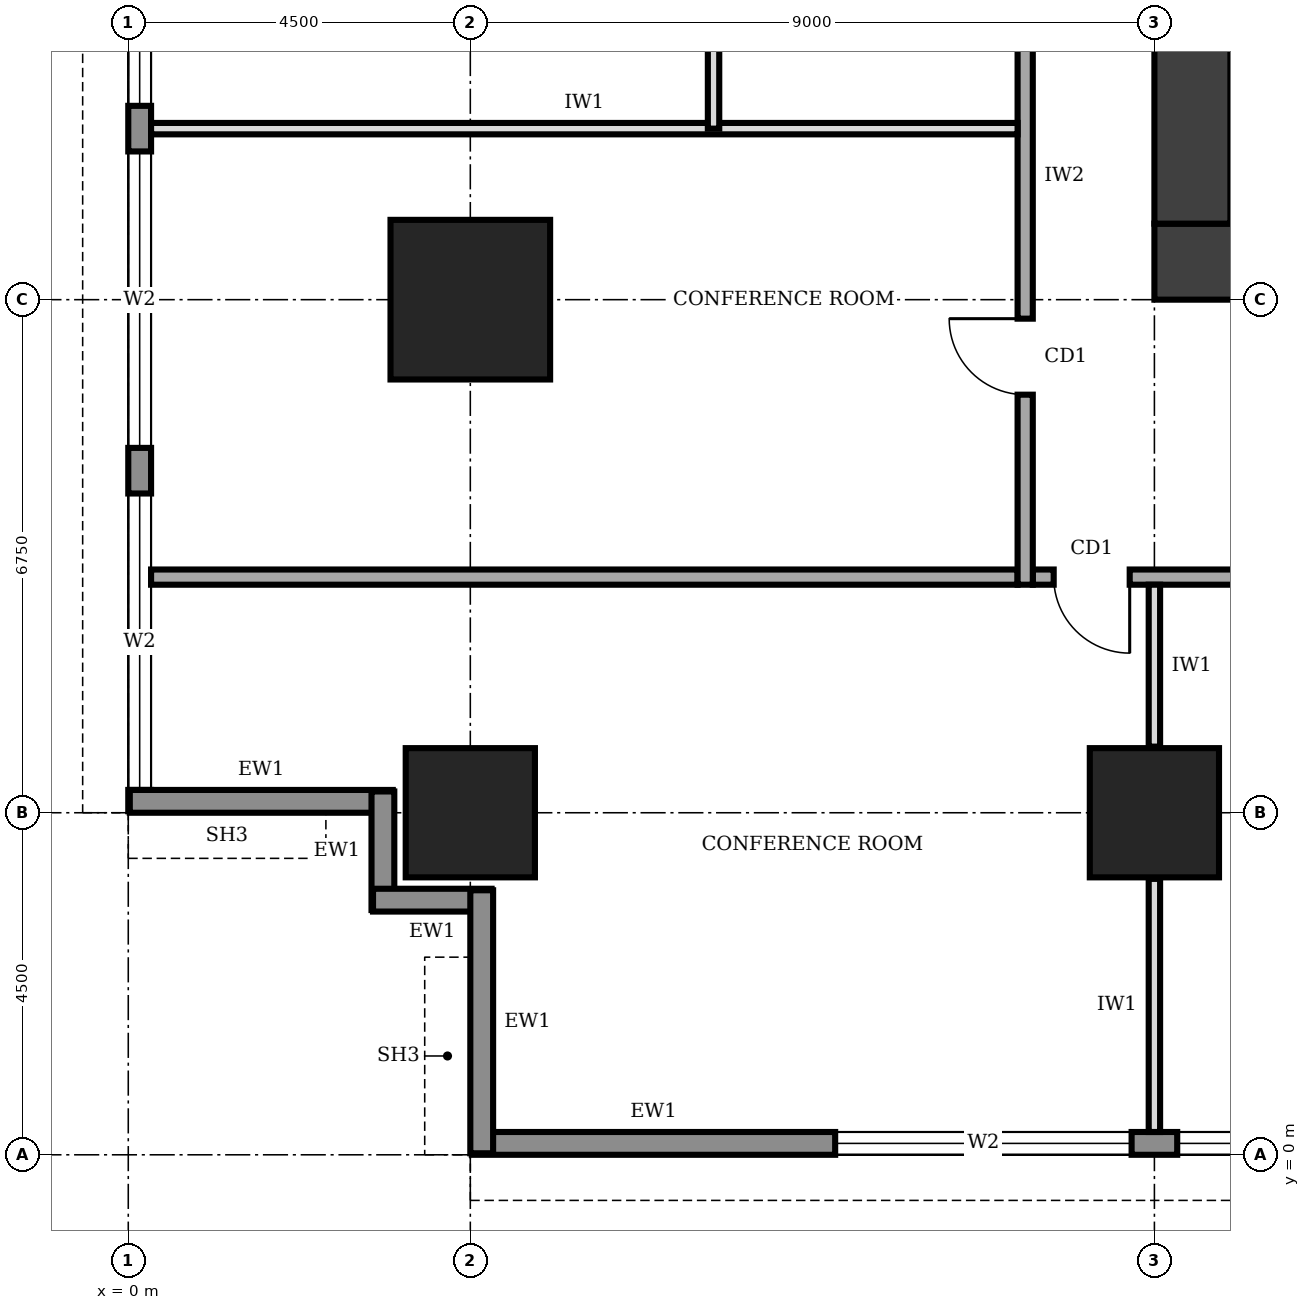
"""IFC4 building model, lengths in metres.
Left out: names, types, materials, properties, quantities, classifications, styles, units other than length and angle.
Written with IfcOpenShell. Run it as: python <this file> out.ifc"""

import sys

from ifc_helpers import new_model, si_unit, direction, frame, frame_2d, origin, origin_2d, place, context, subcontext, project, spatial, rectangle, extrude, element, fill, save


model = new_model("IFC4")
c1 = context("Model", 3, precision=1e-05, world=origin(), true_north=direction((0.0, 1.0)))
c2 = subcontext(c1, "Body", "Model", "MODEL_VIEW")
j1 = project(units=[si_unit("LENGTHUNIT", "METRE"), si_unit("PLANEANGLEUNIT", "RADIAN")], contexts=[c1])
p1 = place(None, origin())
s1 = spatial("IfcSite", under=j1, at=p1, CompositionType="ELEMENT")
p2 = place(p1, origin())
s2 = spatial("IfcBuilding", under=s1, at=p2, CompositionType="ELEMENT")
p3 = place(p2, frame((0.0, 0.0, 149.0)))
s3 = spatial("IfcBuildingStorey", under=s2, at=p3, CompositionType="ELEMENT", Elevation=149.0)
p4 = place(p3, frame((13.5, 11.75, 0.0), z_axis=(0.0, 0.0, 1.0), x_axis=(1.0, 0.0, 0.0)))
e1 = element("IfcWall", 1, at=p4, inside=s3, PredefinedType="SHEAR", context=c2, shape_type="SweptSolid", body=[
    extrude(rectangle(XDim=13.5, YDim=1.0, at=frame_2d((6.75, 0.0))), origin(), (0.0, 0.0, 1.0), 4.0),
])
p5 = place(p4, frame((4.75, 0.0, 0.0)))
e2 = element("IfcOpeningElement", 2, at=p5, cuts=e1, PredefinedType="OPENING", context=c2, shape_type="SweptSolid", body=[
    extrude(rectangle(XDim=1.0, YDim=2.1, at=frame_2d((0.5, 1.05))), frame((0.0, 0.51, 0.0), z_axis=(0.0, -1.0, 0.0), x_axis=(1.0, 0.0, 0.0)), (0.0, 0.0, 1.0), 1.02),
])
p6 = place(p3, frame((14.0, 28.25, 0.0), z_axis=(0.0, 0.0, 1.0), x_axis=(0.0, -1.0, 0.0)))
e3 = element("IfcWall", 3, at=p6, inside=s3, PredefinedType="SHEAR", context=c2, shape_type="SweptSolid", body=[
    extrude(rectangle(XDim=16.0, YDim=1.0, at=frame_2d((8.0, 0.0))), origin(), (0.0, 0.0, 1.0), 4.0),
])
for number, where, z_axis, x_axis in (
    (4, (4.5, 4.5, 0.0), (0.0, 0.0, 1.0), (1.0, 0.0, 0.0)),
    (5, (13.5, 4.5, 0.0), (0.0, 0.0, 1.0), (1.0, 0.0, 0.0)),
):
    element("IfcColumn", number, at=place(p3, frame(where, z_axis=z_axis, x_axis=x_axis)), inside=s3, PredefinedType="COLUMN", context=c2, shape_type="SweptSolid", body=[
        extrude(rectangle(XDim=1.7, YDim=1.7, at=origin_2d()), origin(), (0.0, 0.0, 1.0), 4.0),
    ])
p7 = place(p3, frame((4.5, 11.25, 0.0), z_axis=(0.0, 0.0, 1.0), x_axis=(1.0, 0.0, 0.0)))
e6 = element("IfcColumn", 6, at=p7, inside=s3, PredefinedType="COLUMN", context=c2, shape_type="SweptSolid", body=[
    extrude(rectangle(XDim=2.1, YDim=2.1, at=origin_2d()), origin(), (0.0, 0.0, 1.0), 4.0),
])
p8 = place(p3, frame((4.52, 0.15, 0.0), z_axis=(0.0, 0.0, 1.0), x_axis=(1.0, 0.0, 0.0)))
e7 = element("IfcWall", 7, at=p8, inside=s3, PredefinedType="STANDARD", context=c2, shape_type="SweptSolid", body=[
    extrude(rectangle(XDim=31.46, YDim=0.3, at=frame_2d((15.73, 0.0))), origin(), (0.0, 0.0, 1.0), 3.75),
])
p9 = place(p8, frame((4.78, 0.0, 0.6)))
e8 = element("IfcOpeningElement", 8, at=p9, cuts=e7, PredefinedType="OPENING", context=c2, shape_type="SweptSolid", body=[
    extrude(rectangle(XDim=3.9, YDim=2.6, at=frame_2d((1.95, 1.3))), frame((0.0, 0.16, 0.0), z_axis=(0.0, -1.0, 0.0), x_axis=(1.0, 0.0, 0.0)), (0.0, 0.0, 1.0), 0.32),
])
p10 = place(p8, frame((9.28, 0.0, 0.6)))
e9 = element("IfcOpeningElement", 9, at=p10, cuts=e7, PredefinedType="OPENING", context=c2, shape_type="SweptSolid", body=[
    extrude(rectangle(XDim=3.9, YDim=2.6, at=frame_2d((1.95, 1.3))), frame((0.0, 0.16, 0.0), z_axis=(0.0, -1.0, 0.0), x_axis=(1.0, 0.0, 0.0)), (0.0, 0.0, 1.0), 0.32),
])
p11 = place(p8, frame((13.78, 0.0, 0.6)))
e10 = element("IfcOpeningElement", 10, at=p11, cuts=e7, PredefinedType="OPENING", context=c2, shape_type="SweptSolid", body=[
    extrude(rectangle(XDim=3.9, YDim=2.6, at=frame_2d((1.95, 1.3))), frame((0.0, 0.16, 0.0), z_axis=(0.0, -1.0, 0.0), x_axis=(1.0, 0.0, 0.0)), (0.0, 0.0, 1.0), 0.32),
])
p12 = place(p8, frame((18.28, 0.0, 0.6)))
e11 = element("IfcOpeningElement", 11, at=p12, cuts=e7, PredefinedType="OPENING", context=c2, shape_type="SweptSolid", body=[
    extrude(rectangle(XDim=3.9, YDim=2.6, at=frame_2d((1.95, 1.3))), frame((0.0, 0.16, 0.0), z_axis=(0.0, -1.0, 0.0), x_axis=(1.0, 0.0, 0.0)), (0.0, 0.0, 1.0), 0.32),
])
p13 = place(p8, frame((22.78, 0.0, 0.6)))
e12 = element("IfcOpeningElement", 12, at=p13, cuts=e7, PredefinedType="OPENING", context=c2, shape_type="SweptSolid", body=[
    extrude(rectangle(XDim=3.9, YDim=2.6, at=frame_2d((1.95, 1.3))), frame((0.0, 0.16, 0.0), z_axis=(0.0, -1.0, 0.0), x_axis=(1.0, 0.0, 0.0)), (0.0, 0.0, 1.0), 0.32),
])
p14 = place(p8, frame((27.28, 0.0, 0.6)))
e13 = element("IfcOpeningElement", 13, at=p14, cuts=e7, PredefinedType="OPENING", context=c2, shape_type="SweptSolid", body=[
    extrude(rectangle(XDim=3.9, YDim=2.6, at=frame_2d((1.95, 1.3))), frame((0.0, 0.16, 0.0), z_axis=(0.0, -1.0, 0.0), x_axis=(1.0, 0.0, 0.0)), (0.0, 0.0, 1.0), 0.32),
])
p15 = place(p3, frame((0.15, 35.98, 0.0), z_axis=(0.0, 0.0, 1.0), x_axis=(0.0, -1.0, 0.0)))
e14 = element("IfcWall", 14, at=p15, inside=s3, PredefinedType="STANDARD", context=c2, shape_type="SweptSolid", body=[
    extrude(rectangle(XDim=31.46, YDim=0.3, at=frame_2d((15.73, 0.0))), origin(), (0.0, 0.0, 1.0), 3.75),
])
p16 = place(p15, frame((27.28, 0.0, 0.6)))
e15 = element("IfcOpeningElement", 15, at=p16, cuts=e14, PredefinedType="OPENING", context=c2, shape_type="SweptSolid", body=[
    extrude(rectangle(XDim=3.9, YDim=2.6, at=frame_2d((1.95, 1.3))), frame((0.0, 0.16, 0.0), z_axis=(0.0, -1.0, 0.0), x_axis=(1.0, 0.0, 0.0)), (0.0, 0.0, 1.0), 0.32),
])
p17 = place(p15, frame((22.78, 0.0, 0.6)))
e16 = element("IfcOpeningElement", 16, at=p17, cuts=e14, PredefinedType="OPENING", context=c2, shape_type="SweptSolid", body=[
    extrude(rectangle(XDim=3.9, YDim=2.6, at=frame_2d((1.95, 1.3))), frame((0.0, 0.16, 0.0), z_axis=(0.0, -1.0, 0.0), x_axis=(1.0, 0.0, 0.0)), (0.0, 0.0, 1.0), 0.32),
])
p18 = place(p15, frame((18.28, 0.0, 0.6)))
e17 = element("IfcOpeningElement", 17, at=p18, cuts=e14, PredefinedType="OPENING", context=c2, shape_type="SweptSolid", body=[
    extrude(rectangle(XDim=3.9, YDim=2.6, at=frame_2d((1.95, 1.3))), frame((0.0, 0.16, 0.0), z_axis=(0.0, -1.0, 0.0), x_axis=(1.0, 0.0, 0.0)), (0.0, 0.0, 1.0), 0.32),
])
p19 = place(p15, frame((13.78, 0.0, 0.6)))
e18 = element("IfcOpeningElement", 18, at=p19, cuts=e14, PredefinedType="OPENING", context=c2, shape_type="SweptSolid", body=[
    extrude(rectangle(XDim=3.9, YDim=2.6, at=frame_2d((1.95, 1.3))), frame((0.0, 0.16, 0.0), z_axis=(0.0, -1.0, 0.0), x_axis=(1.0, 0.0, 0.0)), (0.0, 0.0, 1.0), 0.32),
])
p20 = place(p15, frame((9.28, 0.0, 0.6)))
e19 = element("IfcOpeningElement", 19, at=p20, cuts=e14, PredefinedType="OPENING", context=c2, shape_type="SweptSolid", body=[
    extrude(rectangle(XDim=3.9, YDim=2.6, at=frame_2d((1.95, 1.3))), frame((0.0, 0.16, 0.0), z_axis=(0.0, -1.0, 0.0), x_axis=(1.0, 0.0, 0.0)), (0.0, 0.0, 1.0), 0.32),
])
p21 = place(p15, frame((4.78, 0.0, 0.6)))
e20 = element("IfcOpeningElement", 20, at=p21, cuts=e14, PredefinedType="OPENING", context=c2, shape_type="SweptSolid", body=[
    extrude(rectangle(XDim=3.9, YDim=2.6, at=frame_2d((1.95, 1.3))), frame((0.0, 0.16, 0.0), z_axis=(0.0, -1.0, 0.0), x_axis=(1.0, 0.0, 0.0)), (0.0, 0.0, 1.0), 0.32),
])
p22 = place(p3, frame((0.02, 4.65, 0.0), z_axis=(0.0, 0.0, 1.0), x_axis=(1.0, 0.0, 0.0)))
e21 = element("IfcWall", 21, at=p22, inside=s3, PredefinedType="STANDARD", context=c2, shape_type="SweptSolid", body=[
    extrude(rectangle(XDim=3.46, YDim=0.3, at=frame_2d((1.73, 0.0))), origin(), (0.0, 0.0, 1.0), 2.85),
])
for number, where, z_axis, x_axis in (
    (22, (3.35, 4.78, 0.0), (0.0, 0.0, 1.0), (0.0, -1.0, 0.0)),
    (23, (3.22, 3.35, 0.0), (0.0, 0.0, 1.0), (1.0, 0.0, 0.0)),
):
    element("IfcWall", number, at=place(p3, frame(where, z_axis=z_axis, x_axis=x_axis)), inside=s3, PredefinedType="STANDARD", context=c2, shape_type="SweptSolid", body=[
        extrude(rectangle(XDim=1.56, YDim=0.3, at=frame_2d((0.78, 0.0))), origin(), (0.0, 0.0, 1.0), 3.75),
    ])
p23 = place(p3, frame((4.65, 3.48, 0.0), z_axis=(0.0, 0.0, 1.0), x_axis=(0.0, -1.0, 0.0)))
e24 = element("IfcWall", 24, at=p23, inside=s3, PredefinedType="STANDARD", context=c2, shape_type="SweptSolid", body=[
    extrude(rectangle(XDim=3.46, YDim=0.3, at=frame_2d((1.73, 0.0))), origin(), (0.0, 0.0, 1.0), 2.85),
])
p24 = place(p3, frame((11.9, 7.6, 0.0), z_axis=(0.0, 0.0, 1.0), x_axis=(1.0, 0.0, 0.0)))
e25 = element("IfcWall", 25, at=p24, inside=s3, PredefinedType="SOLIDWALL", context=c2, shape_type="SweptSolid", body=[
    extrude(rectangle(XDim=28.3, YDim=0.2, at=frame_2d((14.15, 0.0))), origin(), (0.0, 0.0, 1.0), 3.75),
])
p25 = place(p24, frame((0.275, 0.0, 0.0)))
e26 = element("IfcOpeningElement", 26, at=p25, cuts=e25, PredefinedType="OPENING", context=c2, shape_type="SweptSolid", body=[
    extrude(rectangle(XDim=1.0, YDim=2.1, at=frame_2d((0.5, 1.05))), frame((0.0, 0.11, 0.0), z_axis=(0.0, -1.0, 0.0), x_axis=(1.0, 0.0, 0.0)), (0.0, 0.0, 1.0), 0.22),
])
p26 = place(p24, frame((14.35, 0.0, 0.0)))
e27 = element("IfcOpeningElement", 27, at=p26, cuts=e25, PredefinedType="OPENING", context=c2, shape_type="SweptSolid", body=[
    extrude(rectangle(XDim=1.4, YDim=2.1, at=frame_2d((0.7, 1.05))), frame((0.0, 0.11, 0.0), z_axis=(0.0, -1.0, 0.0), x_axis=(1.0, 0.0, 0.0)), (0.0, 0.0, 1.0), 0.22),
])
p27 = place(p3, frame((11.8, 32.8, 0.0), z_axis=(0.0, 0.0, 1.0), x_axis=(0.0, -1.0, 0.0)))
e28 = element("IfcWall", 28, at=p27, inside=s3, PredefinedType="SOLIDWALL", context=c2, shape_type="SweptSolid", body=[
    extrude(rectangle(XDim=25.3, YDim=0.2, at=frame_2d((12.65, 0.0))), origin(), (0.0, 0.0, 1.0), 3.75),
])
p28 = place(p27, frame((21.8, 0.0, 0.0)))
e29 = element("IfcOpeningElement", 29, at=p28, cuts=e28, PredefinedType="OPENING", context=c2, shape_type="SweptSolid", body=[
    extrude(rectangle(XDim=1.0, YDim=2.1, at=frame_2d((0.5, 1.05))), frame((0.0, 0.11, 0.0), z_axis=(0.0, -1.0, 0.0), x_axis=(1.0, 0.0, 0.0)), (0.0, 0.0, 1.0), 0.22),
])
p29 = place(p27, frame((17.15, 0.0, 0.0)))
e30 = element("IfcOpeningElement", 30, at=p29, cuts=e28, PredefinedType="OPENING", context=c2, shape_type="SweptSolid", body=[
    extrude(rectangle(XDim=0.9, YDim=2.1, at=frame_2d((0.45, 1.05))), frame((0.0, 0.11, 0.0), z_axis=(0.0, -1.0, 0.0), x_axis=(1.0, 0.0, 0.0)), (0.0, 0.0, 1.0), 0.22),
])
p30 = place(p27, frame((12.35, 0.0, 0.0)))
e31 = element("IfcOpeningElement", 31, at=p30, cuts=e28, PredefinedType="OPENING", context=c2, shape_type="SweptSolid", body=[
    extrude(rectangle(XDim=0.9, YDim=2.1, at=frame_2d((0.45, 1.05))), frame((0.0, 0.11, 0.0), z_axis=(0.0, -1.0, 0.0), x_axis=(1.0, 0.0, 0.0)), (0.0, 0.0, 1.0), 0.22),
])
p31 = place(p27, frame((9.3, 0.0, 0.0)))
e32 = element("IfcOpeningElement", 32, at=p31, cuts=e28, PredefinedType="OPENING", context=c2, shape_type="SweptSolid", body=[
    extrude(rectangle(XDim=0.9, YDim=2.1, at=frame_2d((0.45, 1.05))), frame((0.0, 0.11, 0.0), z_axis=(0.0, -1.0, 0.0), x_axis=(1.0, 0.0, 0.0)), (0.0, 0.0, 1.0), 0.22),
])
p32 = place(p27, frame((6.3, 0.0, 0.0)))
e33 = element("IfcOpeningElement", 33, at=p32, cuts=e28, PredefinedType="OPENING", context=c2, shape_type="SweptSolid", body=[
    extrude(rectangle(XDim=1.0, YDim=2.1, at=frame_2d((0.5, 1.05))), frame((0.0, 0.11, 0.0), z_axis=(0.0, -1.0, 0.0), x_axis=(1.0, 0.0, 0.0)), (0.0, 0.0, 1.0), 0.22),
])
p33 = place(p27, frame((14.4, 0.0, 0.0)))
e34 = element("IfcOpeningElement", 34, at=p33, cuts=e28, PredefinedType="OPENING", context=c2, shape_type="SweptSolid", body=[
    extrude(rectangle(XDim=1.0, YDim=2.1, at=frame_2d((0.5, 1.05))), frame((0.0, 0.11, 0.0), z_axis=(0.0, -1.0, 0.0), x_axis=(1.0, 0.0, 0.0)), (0.0, 0.0, 1.0), 0.22),
])
p34 = place(p27, frame((2.3, 0.0, 0.0)))
e35 = element("IfcOpeningElement", 35, at=p34, cuts=e28, PredefinedType="OPENING", context=c2, shape_type="SweptSolid", body=[
    extrude(rectangle(XDim=1.0, YDim=2.1, at=frame_2d((0.5, 1.05))), frame((0.0, 0.11, 0.0), z_axis=(0.0, -1.0, 0.0), x_axis=(1.0, 0.0, 0.0)), (0.0, 0.0, 1.0), 0.22),
])
p35 = place(p3, frame((0.3, 7.6, 0.0), z_axis=(0.0, 0.0, 1.0), x_axis=(1.0, 0.0, 0.0)))
e36 = element("IfcWall", 36, at=p35, inside=s3, PredefinedType="SOLIDWALL", context=c2, shape_type="SweptSolid", body=[
    extrude(rectangle(XDim=11.4, YDim=0.2, at=frame_2d((5.7, 0.0))), origin(), (0.0, 0.0, 1.0), 3.75),
])
p36 = place(p3, frame((13.5, 0.3, 0.0), z_axis=(0.0, 0.0, 1.0), x_axis=(0.0, 1.0, 0.0)))
e37 = element("IfcWall", 37, at=p36, inside=s3, PredefinedType="PARTITIONING", context=c2, shape_type="SweptSolid", body=[
    extrude(rectangle(XDim=3.33, YDim=0.15, at=frame_2d((1.665, 0.0))), origin(), (0.0, 0.0, 1.0), 2.85),
])
p37 = place(p3, frame((13.5, 5.37, 0.0), z_axis=(0.0, 0.0, 1.0), x_axis=(0.0, 1.0, 0.0)))
e38 = element("IfcWall", 38, at=p37, inside=s3, PredefinedType="PARTITIONING", context=c2, shape_type="SweptSolid", body=[
    extrude(rectangle(XDim=2.13, YDim=0.15, at=frame_2d((1.065, 0.0))), origin(), (0.0, 0.0, 1.0), 2.85),
])
p38 = place(p3, frame((0.3, 13.5, 0.0), z_axis=(0.0, 0.0, 1.0), x_axis=(1.0, 0.0, 0.0)))
e39 = element("IfcWall", 39, at=p38, inside=s3, PredefinedType="PARTITIONING", context=c2, shape_type="SweptSolid", body=[
    extrude(rectangle(XDim=11.4, YDim=0.15, at=frame_2d((5.7, 0.0))), origin(), (0.0, 0.0, 1.0), 3.75),
])
p39 = place(p3, frame((7.7, 13.5, 0.0), z_axis=(0.0, 0.0, 1.0), x_axis=(0.0, 1.0, 0.0)))
e40 = element("IfcWall", 40, at=p39, inside=s3, PredefinedType="PARTITIONING", context=c2, shape_type="SweptSolid", body=[
    extrude(rectangle(XDim=3.4, YDim=0.15, at=frame_2d((1.7, 0.0))), origin(), (0.0, 0.0, 1.0), 3.75),
])
p40 = place(p9, origin())
e41 = element("IfcWindow", 41, at=p40, inside=s3, PartitioningType="SINGLE_PANEL", PredefinedType="WINDOW", context=c2, shape_type="SweptSolid", body=[
    extrude(rectangle(XDim=3.9, YDim=2.6, at=frame_2d((1.95, 1.3))), frame((0.0, 0.03, 0.0), z_axis=(0.0, -1.0, 0.0), x_axis=(1.0, 0.0, 0.0)), (0.0, 0.0, 1.0), 0.06),
])
fill(e8, e41)
p41 = place(p10, origin())
e42 = element("IfcWindow", 42, at=p41, inside=s3, PartitioningType="SINGLE_PANEL", PredefinedType="WINDOW", context=c2, shape_type="SweptSolid", body=[
    extrude(rectangle(XDim=3.9, YDim=2.6, at=frame_2d((1.95, 1.3))), frame((0.0, 0.03, 0.0), z_axis=(0.0, -1.0, 0.0), x_axis=(1.0, 0.0, 0.0)), (0.0, 0.0, 1.0), 0.06),
])
fill(e9, e42)
p42 = place(p16, origin())
e43 = element("IfcWindow", 43, at=p42, inside=s3, PartitioningType="SINGLE_PANEL", PredefinedType="WINDOW", context=c2, shape_type="SweptSolid", body=[
    extrude(rectangle(XDim=3.9, YDim=2.6, at=frame_2d((1.95, 1.3))), frame((0.0, 0.03, 0.0), z_axis=(0.0, -1.0, 0.0), x_axis=(1.0, 0.0, 0.0)), (0.0, 0.0, 1.0), 0.06),
])
fill(e15, e43)
p43 = place(p17, origin())
e44 = element("IfcWindow", 44, at=p43, inside=s3, PartitioningType="SINGLE_PANEL", PredefinedType="WINDOW", context=c2, shape_type="SweptSolid", body=[
    extrude(rectangle(XDim=3.9, YDim=2.6, at=frame_2d((1.95, 1.3))), frame((0.0, 0.03, 0.0), z_axis=(0.0, -1.0, 0.0), x_axis=(1.0, 0.0, 0.0)), (0.0, 0.0, 1.0), 0.06),
])
fill(e16, e44)
p44 = place(p18, origin())
e45 = element("IfcWindow", 45, at=p44, inside=s3, PartitioningType="SINGLE_PANEL", PredefinedType="WINDOW", context=c2, shape_type="SweptSolid", body=[
    extrude(rectangle(XDim=3.9, YDim=2.6, at=frame_2d((1.95, 1.3))), frame((0.0, 0.03, 0.0), z_axis=(0.0, -1.0, 0.0), x_axis=(1.0, 0.0, 0.0)), (0.0, 0.0, 1.0), 0.06),
])
fill(e17, e45)
p45 = place(p25, frame((1.0, 0.0, 0.0), z_axis=(0.0, 0.0, 1.0), x_axis=(-1.0, 0.0, 0.0)))
e46 = element("IfcDoor", 46, at=p45, inside=s3, OperationType="SINGLE_SWING_LEFT", PredefinedType="DOOR", context=c2, shape_type="SweptSolid", body=[
    extrude(rectangle(XDim=1.0, YDim=2.1, at=frame_2d((0.5, 1.05))), frame((0.0, 0.025, 0.0), z_axis=(0.0, -1.0, 0.0), x_axis=(1.0, 0.0, 0.0)), (0.0, 0.0, 1.0), 0.05),
])
fill(e26, e46)
p46 = place(p28, frame((1.0, 0.0, 0.0), z_axis=(0.0, 0.0, 1.0), x_axis=(-1.0, 0.0, 0.0)))
e47 = element("IfcDoor", 47, at=p46, inside=s3, OperationType="SINGLE_SWING_RIGHT", PredefinedType="DOOR", context=c2, shape_type="SweptSolid", body=[
    extrude(rectangle(XDim=1.0, YDim=2.1, at=frame_2d((0.5, 1.05))), frame((0.0, 0.025, 0.0), z_axis=(0.0, -1.0, 0.0), x_axis=(1.0, 0.0, 0.0)), (0.0, 0.0, 1.0), 0.05),
])
fill(e29, e47)
save(model, sys.argv[1])
